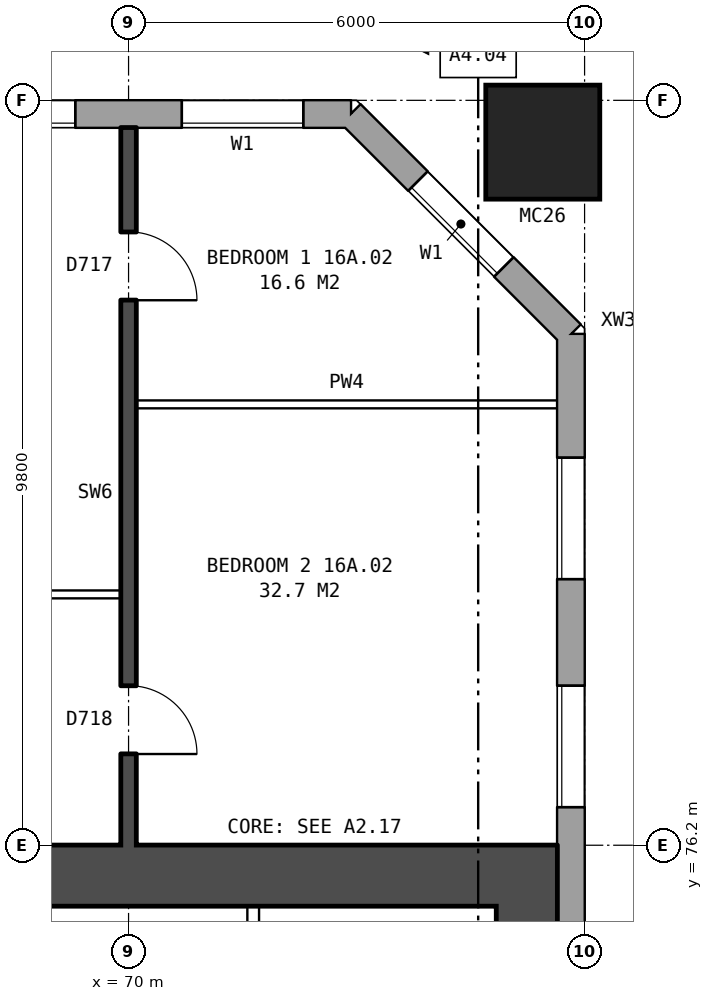
"""IFC4 building model, lengths in metres.
Left out: names, types, materials, properties, quantities, classifications, styles, units other than length and angle.
Written with IfcOpenShell. Run it as: python <this file> out.ifc"""

import sys

from ifc_helpers import new_model, si_unit, direction, frame, frame_2d, origin, origin_2d, place, context, subcontext, project, spatial, rectangle, hollow_rectangle, extrude, element, fill, save


model = new_model("IFC4")
c1 = context("Model", 3, precision=1e-05, world=origin(), true_north=direction((0.0, 1.0)))
c2 = subcontext(c1, "Body", "Model", "MODEL_VIEW")
j1 = project(units=[si_unit("LENGTHUNIT", "METRE"), si_unit("PLANEANGLEUNIT", "RADIAN")], contexts=[c1])
p1 = place(None, origin())
s1 = spatial("IfcSite", under=j1, at=p1, CompositionType="ELEMENT")
p2 = place(p1, origin())
s2 = spatial("IfcBuilding", under=s1, at=p2, CompositionType="ELEMENT")
p3 = place(p2, frame((0.0, 0.0, 59.8)))
s3 = spatial("IfcBuildingStorey", under=s2, at=p3, CompositionType="ELEMENT", Elevation=59.8)
p4 = place(p3, frame((75.45, 85.45, 0.0), z_axis=(0.0, 0.0, 1.0), x_axis=(1.0, 0.0, 0.0)))
e1 = element("IfcColumn", 1, at=p4, inside=s3, PredefinedType="COLUMN", context=c2, shape_type="SweptSolid", body=[
    extrude(hollow_rectangle(XDim=1.5, YDim=1.5, WallThickness=0.08, at=origin_2d()), origin(), (0.0, 0.0, 1.0), 3.1),
])
p5 = place(p3, frame((75.82, 57.075, 0.0), z_axis=(0.0, 0.0, 1.0), x_axis=(0.0, 1.0, 0.0)))
e2 = element("IfcWall", 2, at=p5, inside=s3, PredefinedType="STANDARD", context=c2, shape_type="SweptSolid", body=[
    extrude(rectangle(XDim=25.851, YDim=0.36, at=frame_2d((12.925, 0.0))), origin(), (0.0, 0.0, 1.0), 2.85),
])
p6 = place(p5, frame((1.625, 0.0, 0.8)))
e3 = element("IfcOpeningElement", 3, at=p6, cuts=e2, PredefinedType="OPENING", context=c2, shape_type="SweptSolid", body=[
    extrude(rectangle(XDim=1.6, YDim=1.8, at=frame_2d((0.8, 0.9))), frame((0.0, 0.19, 0.0), z_axis=(0.0, -1.0, 0.0), x_axis=(1.0, 0.0, 0.0)), (0.0, 0.0, 1.0), 0.38),
])
p7 = place(p5, frame((4.625, 0.0, 0.8)))
e4 = element("IfcOpeningElement", 4, at=p7, cuts=e2, PredefinedType="OPENING", context=c2, shape_type="SweptSolid", body=[
    extrude(rectangle(XDim=1.6, YDim=1.8, at=frame_2d((0.8, 0.9))), frame((0.0, 0.19, 0.0), z_axis=(0.0, -1.0, 0.0), x_axis=(1.0, 0.0, 0.0)), (0.0, 0.0, 1.0), 0.38),
])
p8 = place(p5, frame((19.625, 0.0, 0.8)))
e5 = element("IfcOpeningElement", 5, at=p8, cuts=e2, PredefinedType="OPENING", context=c2, shape_type="SweptSolid", body=[
    extrude(rectangle(XDim=1.6, YDim=1.8, at=frame_2d((0.8, 0.9))), frame((0.0, 0.19, 0.0), z_axis=(0.0, -1.0, 0.0), x_axis=(1.0, 0.0, 0.0)), (0.0, 0.0, 1.0), 0.38),
])
p9 = place(p5, frame((22.625, 0.0, 0.8)))
e6 = element("IfcOpeningElement", 6, at=p9, cuts=e2, PredefinedType="OPENING", context=c2, shape_type="SweptSolid", body=[
    extrude(rectangle(XDim=1.6, YDim=1.8, at=frame_2d((0.8, 0.9))), frame((0.0, 0.19, 0.0), z_axis=(0.0, -1.0, 0.0), x_axis=(1.0, 0.0, 0.0)), (0.0, 0.0, 1.0), 0.38),
])
p10 = place(p3, frame((75.82, 82.925, 0.0), z_axis=(0.0, 0.0, 1.0), x_axis=(-0.707106781187, 0.707106781187, 0.0)))
e7 = element("IfcWall", 7, at=p10, inside=s3, PredefinedType="STANDARD", context=c2, shape_type="SweptSolid", body=[
    extrude(rectangle(XDim=4.094, YDim=0.36, at=frame_2d((2.047, 0.0))), origin(), (0.0, 0.0, 1.0), 2.85),
])
p11 = place(p10, frame((1.247, 0.0, 0.8)))
e8 = element("IfcOpeningElement", 8, at=p11, cuts=e7, PredefinedType="OPENING", context=c2, shape_type="SweptSolid", body=[
    extrude(rectangle(XDim=1.6, YDim=1.8, at=frame_2d((0.8, 0.9))), frame((0.0, 0.19, 0.0), z_axis=(0.0, -1.0, 0.0), x_axis=(1.0, 0.0, 0.0)), (0.0, 0.0, 1.0), 0.38),
])
p12 = place(p3, frame((72.925, 85.82, 0.0), z_axis=(0.0, 0.0, 1.0), x_axis=(-1.0, 0.0, 0.0)))
e9 = element("IfcWall", 9, at=p12, inside=s3, PredefinedType="STANDARD", context=c2, shape_type="SweptSolid", body=[
    extrude(rectangle(XDim=48.351, YDim=0.36, at=frame_2d((24.175, 0.0))), origin(), (0.0, 0.0, 1.0), 2.85),
])
p13 = place(p12, frame((0.625, 0.0, 0.8)))
e10 = element("IfcOpeningElement", 10, at=p13, cuts=e9, PredefinedType="OPENING", context=c2, shape_type="SweptSolid", body=[
    extrude(rectangle(XDim=1.6, YDim=1.8, at=frame_2d((0.8, 0.9))), frame((0.0, 0.19, 0.0), z_axis=(0.0, -1.0, 0.0), x_axis=(1.0, 0.0, 0.0)), (0.0, 0.0, 1.0), 0.38),
])
p14 = place(p12, frame((3.625, 0.0, 0.8)))
e11 = element("IfcOpeningElement", 11, at=p14, cuts=e9, PredefinedType="OPENING", context=c2, shape_type="SweptSolid", body=[
    extrude(rectangle(XDim=1.6, YDim=1.8, at=frame_2d((0.8, 0.9))), frame((0.0, 0.19, 0.0), z_axis=(0.0, -1.0, 0.0), x_axis=(1.0, 0.0, 0.0)), (0.0, 0.0, 1.0), 0.38),
])
p15 = place(p12, frame((6.625, 0.0, 0.8)))
e12 = element("IfcOpeningElement", 12, at=p15, cuts=e9, PredefinedType="OPENING", context=c2, shape_type="SweptSolid", body=[
    extrude(rectangle(XDim=1.6, YDim=1.8, at=frame_2d((0.8, 0.9))), frame((0.0, 0.19, 0.0), z_axis=(0.0, -1.0, 0.0), x_axis=(1.0, 0.0, 0.0)), (0.0, 0.0, 1.0), 0.38),
])
p16 = place(p12, frame((9.625, 0.0, 0.8)))
e13 = element("IfcOpeningElement", 13, at=p16, cuts=e9, PredefinedType="OPENING", context=c2, shape_type="SweptSolid", body=[
    extrude(rectangle(XDim=1.6, YDim=1.8, at=frame_2d((0.8, 0.9))), frame((0.0, 0.19, 0.0), z_axis=(0.0, -1.0, 0.0), x_axis=(1.0, 0.0, 0.0)), (0.0, 0.0, 1.0), 0.38),
])
p17 = place(p12, frame((12.625, 0.0, 0.8)))
e14 = element("IfcOpeningElement", 14, at=p17, cuts=e9, PredefinedType="OPENING", context=c2, shape_type="SweptSolid", body=[
    extrude(rectangle(XDim=1.6, YDim=1.8, at=frame_2d((0.8, 0.9))), frame((0.0, 0.19, 0.0), z_axis=(0.0, -1.0, 0.0), x_axis=(1.0, 0.0, 0.0)), (0.0, 0.0, 1.0), 0.38),
])
p18 = place(p12, frame((15.625, 0.0, 0.8)))
e15 = element("IfcOpeningElement", 15, at=p18, cuts=e9, PredefinedType="OPENING", context=c2, shape_type="SweptSolid", body=[
    extrude(rectangle(XDim=1.6, YDim=1.8, at=frame_2d((0.8, 0.9))), frame((0.0, 0.19, 0.0), z_axis=(0.0, -1.0, 0.0), x_axis=(1.0, 0.0, 0.0)), (0.0, 0.0, 1.0), 0.38),
])
p19 = place(p12, frame((18.625, 0.0, 0.8)))
e16 = element("IfcOpeningElement", 16, at=p19, cuts=e9, PredefinedType="OPENING", context=c2, shape_type="SweptSolid", body=[
    extrude(rectangle(XDim=1.6, YDim=1.8, at=frame_2d((0.8, 0.9))), frame((0.0, 0.19, 0.0), z_axis=(0.0, -1.0, 0.0), x_axis=(1.0, 0.0, 0.0)), (0.0, 0.0, 1.0), 0.38),
])
p20 = place(p12, frame((21.125, 0.0, 1.65)))
e17 = element("IfcOpeningElement", 17, at=p20, cuts=e9, PredefinedType="OPENING", context=c2, shape_type="SweptSolid", body=[
    extrude(rectangle(XDim=0.8, YDim=0.9, at=frame_2d((0.4, 0.45))), frame((0.0, 0.19, 0.0), z_axis=(0.0, -1.0, 0.0), x_axis=(1.0, 0.0, 0.0)), (0.0, 0.0, 1.0), 0.38),
])
p21 = place(p12, frame((24.075, 0.0, 0.25)))
e18 = element("IfcOpeningElement", 18, at=p21, cuts=e9, PredefinedType="OPENING", context=c2, shape_type="SweptSolid", body=[
    extrude(rectangle(XDim=0.8, YDim=1.5, at=frame_2d((0.4, 0.75))), frame((0.0, 0.19, 0.0), z_axis=(0.0, -1.0, 0.0), x_axis=(1.0, 0.0, 0.0)), (0.0, 0.0, 1.0), 0.38),
])
p22 = place(p12, frame((27.625, 0.0, 0.8)))
e19 = element("IfcOpeningElement", 19, at=p22, cuts=e9, PredefinedType="OPENING", context=c2, shape_type="SweptSolid", body=[
    extrude(rectangle(XDim=1.6, YDim=1.8, at=frame_2d((0.8, 0.9))), frame((0.0, 0.19, 0.0), z_axis=(0.0, -1.0, 0.0), x_axis=(1.0, 0.0, 0.0)), (0.0, 0.0, 1.0), 0.38),
])
p23 = place(p12, frame((30.625, 0.0, 0.8)))
e20 = element("IfcOpeningElement", 20, at=p23, cuts=e9, PredefinedType="OPENING", context=c2, shape_type="SweptSolid", body=[
    extrude(rectangle(XDim=1.6, YDim=1.8, at=frame_2d((0.8, 0.9))), frame((0.0, 0.19, 0.0), z_axis=(0.0, -1.0, 0.0), x_axis=(1.0, 0.0, 0.0)), (0.0, 0.0, 1.0), 0.38),
])
p24 = place(p12, frame((33.625, 0.0, 0.8)))
e21 = element("IfcOpeningElement", 21, at=p24, cuts=e9, PredefinedType="OPENING", context=c2, shape_type="SweptSolid", body=[
    extrude(rectangle(XDim=1.6, YDim=1.8, at=frame_2d((0.8, 0.9))), frame((0.0, 0.19, 0.0), z_axis=(0.0, -1.0, 0.0), x_axis=(1.0, 0.0, 0.0)), (0.0, 0.0, 1.0), 0.38),
])
p25 = place(p12, frame((36.625, 0.0, 0.8)))
e22 = element("IfcOpeningElement", 22, at=p25, cuts=e9, PredefinedType="OPENING", context=c2, shape_type="SweptSolid", body=[
    extrude(rectangle(XDim=1.6, YDim=1.8, at=frame_2d((0.8, 0.9))), frame((0.0, 0.19, 0.0), z_axis=(0.0, -1.0, 0.0), x_axis=(1.0, 0.0, 0.0)), (0.0, 0.0, 1.0), 0.38),
])
p26 = place(p12, frame((39.625, 0.0, 0.8)))
e23 = element("IfcOpeningElement", 23, at=p26, cuts=e9, PredefinedType="OPENING", context=c2, shape_type="SweptSolid", body=[
    extrude(rectangle(XDim=1.6, YDim=1.8, at=frame_2d((0.8, 0.9))), frame((0.0, 0.19, 0.0), z_axis=(0.0, -1.0, 0.0), x_axis=(1.0, 0.0, 0.0)), (0.0, 0.0, 1.0), 0.38),
])
p27 = place(p12, frame((42.625, 0.0, 0.8)))
e24 = element("IfcOpeningElement", 24, at=p27, cuts=e9, PredefinedType="OPENING", context=c2, shape_type="SweptSolid", body=[
    extrude(rectangle(XDim=1.6, YDim=1.8, at=frame_2d((0.8, 0.9))), frame((0.0, 0.19, 0.0), z_axis=(0.0, -1.0, 0.0), x_axis=(1.0, 0.0, 0.0)), (0.0, 0.0, 1.0), 0.38),
])
p28 = place(p12, frame((45.625, 0.0, 0.8)))
e25 = element("IfcOpeningElement", 25, at=p28, cuts=e9, PredefinedType="OPENING", context=c2, shape_type="SweptSolid", body=[
    extrude(rectangle(XDim=1.6, YDim=1.8, at=frame_2d((0.8, 0.9))), frame((0.0, 0.19, 0.0), z_axis=(0.0, -1.0, 0.0), x_axis=(1.0, 0.0, 0.0)), (0.0, 0.0, 1.0), 0.38),
])
p29 = place(p12, frame((22.425, 0.0, 0.15)))
e26 = element("IfcOpeningElement", 26, at=p29, cuts=e9, PredefinedType="OPENING", context=c2, shape_type="SweptSolid", body=[
    extrude(rectangle(XDim=1.2, YDim=0.9, at=frame_2d((0.6, 0.45))), frame((0.0, 0.19, 0.0), z_axis=(0.0, -1.0, 0.0), x_axis=(1.0, 0.0, 0.0)), (0.0, 0.0, 1.0), 0.38),
])
p30 = place(p12, frame((25.175, 0.0, 0.25)))
e27 = element("IfcOpeningElement", 27, at=p30, cuts=e9, PredefinedType="OPENING", context=c2, shape_type="SweptSolid", body=[
    extrude(rectangle(XDim=0.6, YDim=0.9, at=frame_2d((0.3, 0.45))), frame((0.0, 0.19, 0.0), z_axis=(0.0, -1.0, 0.0), x_axis=(1.0, 0.0, 0.0)), (0.0, 0.0, 1.0), 0.38),
])
p31 = place(p3, frame((75.24, 64.6, 0.0), z_axis=(0.0, 0.0, 1.0), x_axis=(0.0, 1.0, 0.0)))
e28 = element("IfcWall", 28, at=p31, inside=s3, PredefinedType="SHEAR", context=c2, shape_type="SweptSolid", body=[
    extrude(rectangle(XDim=10.8, YDim=0.8, at=frame_2d((5.4, 0.0))), origin(), (0.0, 0.0, 1.0), 2.85),
])
p32 = place(p3, frame((66.64, 75.8, 0.0), z_axis=(0.0, 0.0, 1.0), x_axis=(1.0, 0.0, 0.0)))
e29 = element("IfcWall", 29, at=p32, inside=s3, PredefinedType="SHEAR", context=c2, shape_type="SweptSolid", body=[
    extrude(rectangle(XDim=9.0, YDim=0.8, at=frame_2d((4.5, 0.0))), origin(), (0.0, 0.0, 1.0), 2.85),
])
p33 = place(p3, frame((71.64, 73.45, 0.0), z_axis=(0.0, 0.0, 1.0), x_axis=(0.0, 1.0, 0.0)))
e30 = element("IfcWall", 30, at=p33, inside=s3, PredefinedType="PARTITIONING", context=c2, shape_type="SweptSolid", body=[
    extrude(rectangle(XDim=1.95, YDim=0.15, at=frame_2d((0.975, 0.0))), origin(), (0.0, 0.0, 1.0), 2.85),
])
p34 = place(p33, frame((0.55, 0.0, 0.0)))
e31 = element("IfcOpeningElement", 31, at=p34, cuts=e30, PredefinedType="OPENING", context=c2, shape_type="SweptSolid", body=[
    extrude(rectangle(XDim=0.85, YDim=2.1, at=frame_2d((0.425, 1.05))), frame((0.0, 0.085, 0.0), z_axis=(0.0, -1.0, 0.0), x_axis=(1.0, 0.0, 0.0)), (0.0, 0.0, 1.0), 0.17),
])
p35 = place(p3, frame((64.1, 79.5, 0.0), z_axis=(0.0, 0.0, 1.0), x_axis=(1.0, 0.0, 0.0)))
e32 = element("IfcWall", 32, at=p35, inside=s3, PredefinedType="PARTITIONING", context=c2, shape_type="SweptSolid", body=[
    extrude(rectangle(XDim=5.8, YDim=0.1, at=frame_2d((2.9, 0.0))), origin(), (0.0, 0.0, 1.0), 2.85),
])
p36 = place(p35, frame((3.6, 0.0, 0.0)))
e33 = element("IfcOpeningElement", 33, at=p36, cuts=e32, PredefinedType="OPENING", context=c2, shape_type="SweptSolid", body=[
    extrude(rectangle(XDim=0.9, YDim=2.1, at=frame_2d((0.45, 1.05))), frame((0.0, 0.06, 0.0), z_axis=(0.0, -1.0, 0.0), x_axis=(1.0, 0.0, 0.0)), (0.0, 0.0, 1.0), 0.12),
])
p37 = place(p35, frame((0.7, 0.0, 0.0)))
e34 = element("IfcOpeningElement", 34, at=p37, cuts=e32, PredefinedType="OPENING", context=c2, shape_type="SweptSolid", body=[
    extrude(rectangle(XDim=0.9, YDim=2.1, at=frame_2d((0.45, 1.05))), frame((0.0, 0.06, 0.0), z_axis=(0.0, -1.0, 0.0), x_axis=(1.0, 0.0, 0.0)), (0.0, 0.0, 1.0), 0.12),
])
p38 = place(p3, frame((70.1, 82.0, 0.0), z_axis=(0.0, 0.0, 1.0), x_axis=(1.0, 0.0, 0.0)))
e35 = element("IfcWall", 35, at=p38, inside=s3, PredefinedType="PARTITIONING", context=c2, shape_type="SweptSolid", body=[
    extrude(rectangle(XDim=5.54, YDim=0.1, at=frame_2d((2.77, 0.0))), origin(), (0.0, 0.0, 1.0), 2.85),
])
p39 = place(p3, frame((70.0, 76.2, 0.0), z_axis=(0.0, 0.0, 1.0), x_axis=(0.0, 1.0, 0.0)))
e36 = element("IfcWall", 36, at=p39, inside=s3, PredefinedType="SOLIDWALL", context=c2, shape_type="SweptSolid", body=[
    extrude(rectangle(XDim=9.44, YDim=0.2, at=frame_2d((4.72, 0.0))), origin(), (0.0, 0.0, 1.0), 2.85),
])
p40 = place(p39, frame((7.17, 0.0, 0.0)))
e37 = element("IfcOpeningElement", 37, at=p40, cuts=e36, PredefinedType="OPENING", context=c2, shape_type="SweptSolid", body=[
    extrude(rectangle(XDim=0.9, YDim=2.1, at=frame_2d((0.45, 1.05))), frame((0.0, 0.11, 0.0), z_axis=(0.0, -1.0, 0.0), x_axis=(1.0, 0.0, 0.0)), (0.0, 0.0, 1.0), 0.22),
])
p41 = place(p39, frame((1.2, 0.0, 0.0)))
e38 = element("IfcOpeningElement", 38, at=p41, cuts=e36, PredefinedType="OPENING", context=c2, shape_type="SweptSolid", body=[
    extrude(rectangle(XDim=0.9, YDim=2.1, at=frame_2d((0.45, 1.05))), frame((0.0, 0.11, 0.0), z_axis=(0.0, -1.0, 0.0), x_axis=(1.0, 0.0, 0.0)), (0.0, 0.0, 1.0), 0.22),
])
p42 = place(p8, origin())
e39 = element("IfcWindow", 39, at=p42, inside=s3, PartitioningType="SINGLE_PANEL", PredefinedType="WINDOW", context=c2, shape_type="SweptSolid", body=[
    extrude(rectangle(XDim=1.6, YDim=1.8, at=frame_2d((0.8, 0.9))), frame((0.0, 0.15, 0.0), z_axis=(0.0, -1.0, 0.0), x_axis=(1.0, 0.0, 0.0)), (0.0, 0.0, 1.0), 0.06),
])
fill(e5, e39)
p43 = place(p9, origin())
e40 = element("IfcWindow", 40, at=p43, inside=s3, PartitioningType="SINGLE_PANEL", PredefinedType="WINDOW", context=c2, shape_type="SweptSolid", body=[
    extrude(rectangle(XDim=1.6, YDim=1.8, at=frame_2d((0.8, 0.9))), frame((0.0, 0.15, 0.0), z_axis=(0.0, -1.0, 0.0), x_axis=(1.0, 0.0, 0.0)), (0.0, 0.0, 1.0), 0.06),
])
fill(e6, e40)
p44 = place(p11, origin())
e41 = element("IfcWindow", 41, at=p44, inside=s3, PartitioningType="SINGLE_PANEL", PredefinedType="WINDOW", context=c2, shape_type="SweptSolid", body=[
    extrude(rectangle(XDim=1.6, YDim=1.8, at=frame_2d((0.8, 0.9))), frame((0.0, 0.15, 0.0), z_axis=(0.0, -1.0, 0.0), x_axis=(1.0, 0.0, 0.0)), (0.0, 0.0, 1.0), 0.06),
])
fill(e8, e41)
p45 = place(p13, origin())
e42 = element("IfcWindow", 42, at=p45, inside=s3, PartitioningType="SINGLE_PANEL", PredefinedType="WINDOW", context=c2, shape_type="SweptSolid", body=[
    extrude(rectangle(XDim=1.6, YDim=1.8, at=frame_2d((0.8, 0.9))), frame((0.0, 0.15, 0.0), z_axis=(0.0, -1.0, 0.0), x_axis=(1.0, 0.0, 0.0)), (0.0, 0.0, 1.0), 0.06),
])
fill(e10, e42)
p46 = place(p14, origin())
e43 = element("IfcWindow", 43, at=p46, inside=s3, PartitioningType="SINGLE_PANEL", PredefinedType="WINDOW", context=c2, shape_type="SweptSolid", body=[
    extrude(rectangle(XDim=1.6, YDim=1.8, at=frame_2d((0.8, 0.9))), frame((0.0, 0.15, 0.0), z_axis=(0.0, -1.0, 0.0), x_axis=(1.0, 0.0, 0.0)), (0.0, 0.0, 1.0), 0.06),
])
fill(e11, e43)
p47 = place(p40, frame((0.9, 0.0, 0.0), z_axis=(0.0, 0.0, 1.0), x_axis=(-1.0, 0.0, 0.0)))
e44 = element("IfcDoor", 44, at=p47, inside=s3, OperationType="SINGLE_SWING_RIGHT", PredefinedType="DOOR", context=c2, shape_type="SweptSolid", body=[
    extrude(rectangle(XDim=0.9, YDim=2.1, at=frame_2d((0.45, 1.05))), frame((0.0, 0.025, 0.0), z_axis=(0.0, -1.0, 0.0), x_axis=(1.0, 0.0, 0.0)), (0.0, 0.0, 1.0), 0.05),
])
fill(e37, e44)
p48 = place(p41, frame((0.9, 0.0, 0.0), z_axis=(0.0, 0.0, 1.0), x_axis=(-1.0, 0.0, 0.0)))
e45 = element("IfcDoor", 45, at=p48, inside=s3, OperationType="SINGLE_SWING_RIGHT", PredefinedType="DOOR", context=c2, shape_type="SweptSolid", body=[
    extrude(rectangle(XDim=0.9, YDim=2.1, at=frame_2d((0.45, 1.05))), frame((0.0, 0.025, 0.0), z_axis=(0.0, -1.0, 0.0), x_axis=(1.0, 0.0, 0.0)), (0.0, 0.0, 1.0), 0.05),
])
fill(e38, e45)
save(model, sys.argv[1])
